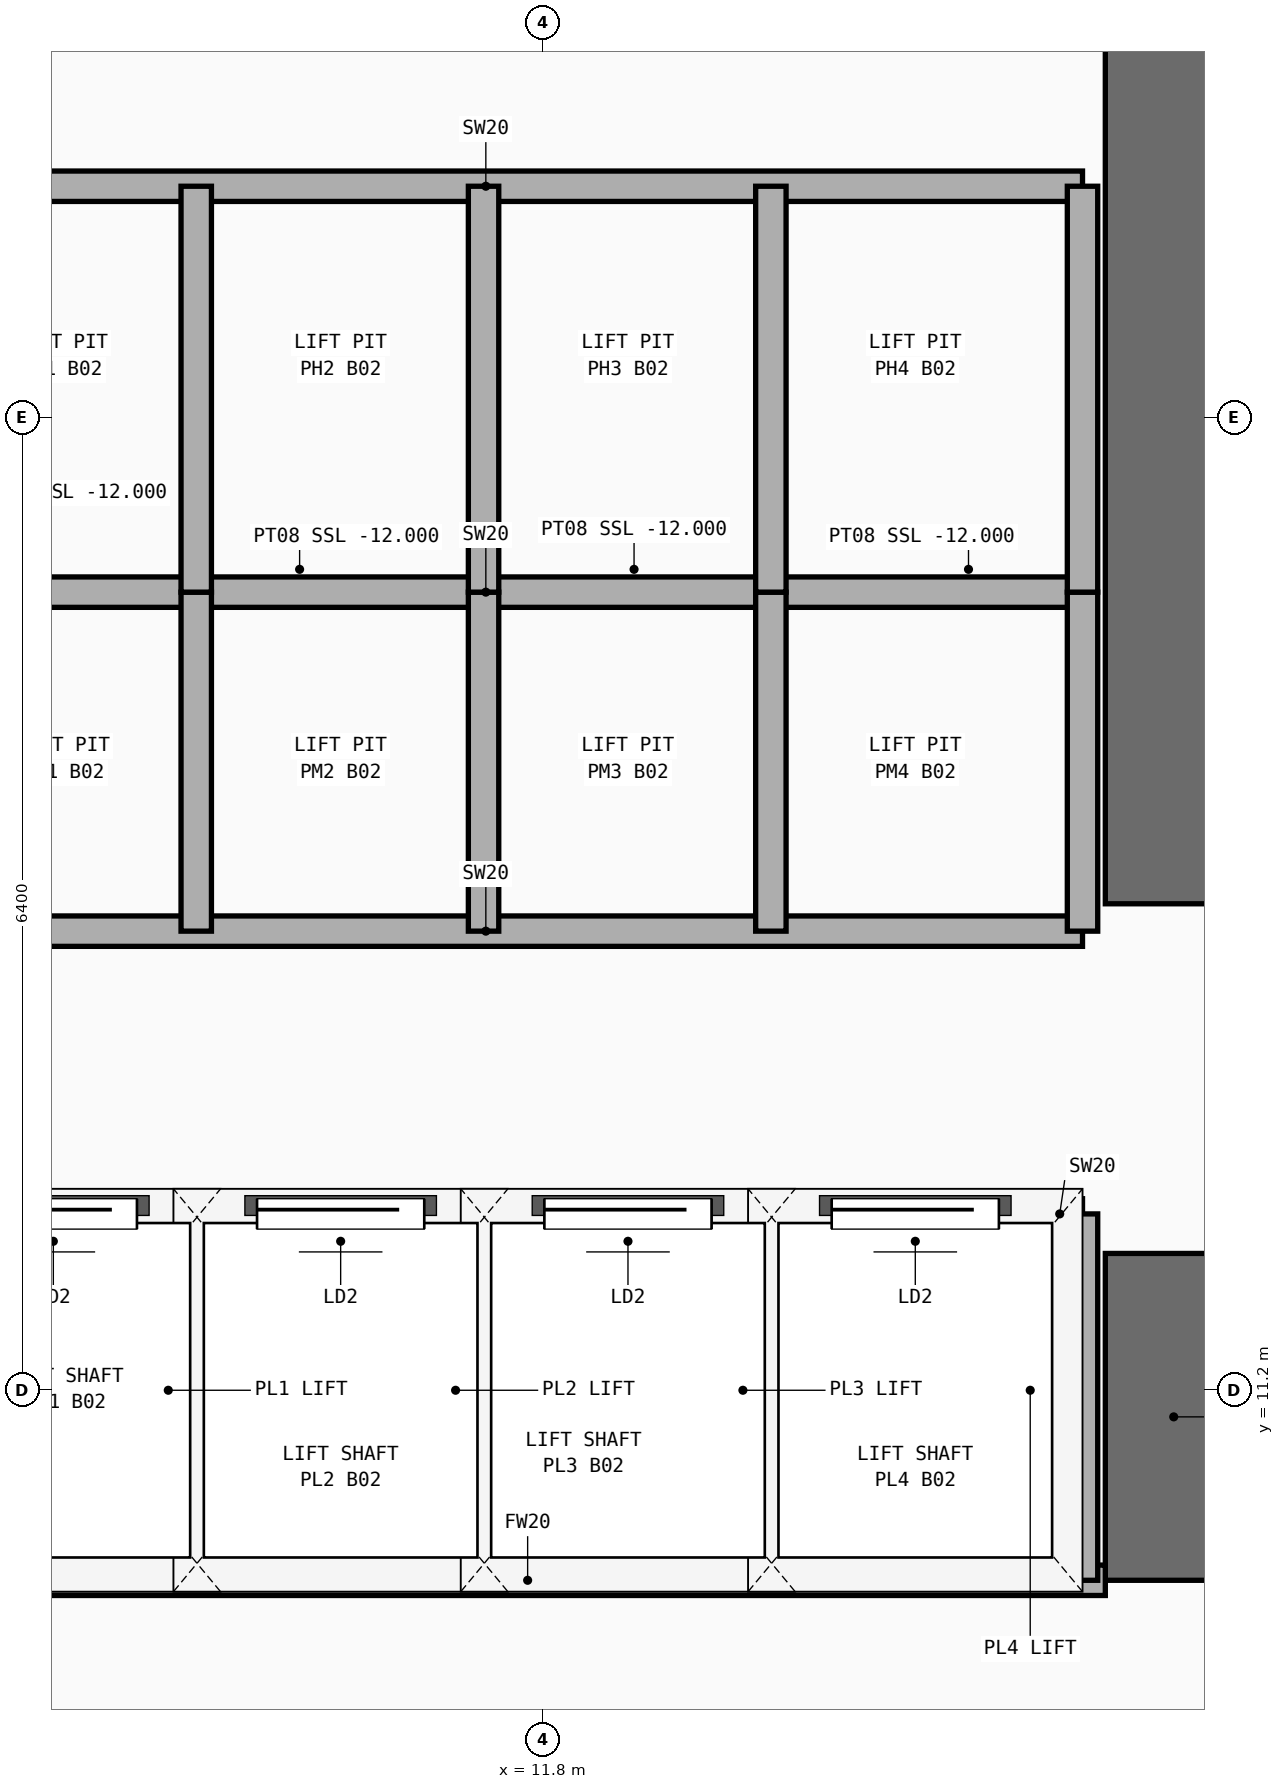
"""IFC4 building model, lengths in metres.
Left out: names, types, materials, properties, quantities, classifications, styles, units other than length and angle.
Written with IfcOpenShell. Run it as: python <this file> out.ifc"""

import sys

from ifc_helpers import new_model, si_unit, direction, frame, frame_2d, origin, place, context, subcontext, project, spatial, rectangle, extrude, element, fill, save


model = new_model("IFC4")
c1 = context("Model", 3, precision=1e-05, world=origin(), true_north=direction((0.0, 1.0)))
c2 = subcontext(c1, "Body", "Model", "MODEL_VIEW")
j1 = project(units=[si_unit("LENGTHUNIT", "METRE"), si_unit("PLANEANGLEUNIT", "RADIAN")], contexts=[c1])
p1 = place(None, origin())
s1 = spatial("IfcSite", under=j1, at=p1, CompositionType="ELEMENT")
p2 = place(p1, origin())
s2 = spatial("IfcBuilding", under=s1, at=p2, CompositionType="ELEMENT")
p3 = place(p2, frame((0.0, 0.0, -8.4)))
s3 = spatial("IfcBuildingStorey", under=s2, at=p3, CompositionType="ELEMENT", Elevation=-8.4)
p4 = place(p3, frame((15.95, 9.95, 0.0), z_axis=(0.0, 0.0, 1.0), x_axis=(0.0, 1.0, 0.0)))
e1 = element("IfcWall", 1, at=p4, inside=s3, PredefinedType="SHEAR", context=c2, shape_type="SweptSolid", body=[
    extrude(rectangle(XDim=2.15, YDim=0.9, at=frame_2d((1.075, 0.0))), origin(), (0.0, 0.0, 1.0), 3.86),
])
p5 = place(p3, frame((15.95, 14.4, 0.0), z_axis=(0.0, 0.0, 1.0), x_axis=(0.0, 1.0, 0.0)))
e2 = element("IfcWall", 2, at=p5, inside=s3, PredefinedType="SHEAR", context=c2, shape_type="SweptSolid", body=[
    extrude(rectangle(XDim=9.1, YDim=0.9, at=frame_2d((4.55, 0.0))), origin(), (0.0, 0.0, 1.0), 3.86),
])
p6 = place(p3, frame((7.9, 9.95, 0.0), z_axis=(0.0, 0.0, 1.0), x_axis=(1.0, 0.0, 0.0)))
e3 = element("IfcWall", 3, at=p6, inside=s3, PredefinedType="PARTITIONING", context=c2, shape_type="SweptSolid", body=[
    extrude(rectangle(XDim=7.6, YDim=0.2, at=frame_2d((3.8, 0.0))), origin(), (0.0, 0.0, 1.0), 3.86),
])
p7 = place(p3, frame((7.5, 12.36, 0.0), z_axis=(0.0, 0.0, 1.0), x_axis=(1.0, 0.0, 0.0)))
e4 = element("IfcWall", 4, at=p7, inside=s3, PredefinedType="PARTITIONING", context=c2, shape_type="SweptSolid", body=[
    extrude(rectangle(XDim=7.85, YDim=0.2, at=frame_2d((3.925, 0.0))), origin(), (0.0, 0.0, 1.0), 3.86),
])
p8 = place(p7, frame((0.53, 0.0, 0.0)))
e5 = element("IfcOpeningElement", 5, at=p8, cuts=e4, PredefinedType="OPENING", context=c2, shape_type="SweptSolid", body=[
    extrude(rectangle(XDim=1.1, YDim=2.2, at=frame_2d((0.55, 1.1))), frame((0.0, 0.11, 0.0), z_axis=(0.0, -1.0, 0.0), x_axis=(1.0, 0.0, 0.0)), (0.0, 0.0, 1.0), 0.22),
])
p9 = place(p7, frame((2.42, 0.0, 0.0)))
e6 = element("IfcOpeningElement", 6, at=p9, cuts=e4, PredefinedType="OPENING", context=c2, shape_type="SweptSolid", body=[
    extrude(rectangle(XDim=1.1, YDim=2.2, at=frame_2d((0.55, 1.1))), frame((0.0, 0.11, 0.0), z_axis=(0.0, -1.0, 0.0), x_axis=(1.0, 0.0, 0.0)), (0.0, 0.0, 1.0), 0.22),
])
p10 = place(p7, frame((4.31, 0.0, 0.0)))
e7 = element("IfcOpeningElement", 7, at=p10, cuts=e4, PredefinedType="OPENING", context=c2, shape_type="SweptSolid", body=[
    extrude(rectangle(XDim=1.1, YDim=2.2, at=frame_2d((0.55, 1.1))), frame((0.0, 0.11, 0.0), z_axis=(0.0, -1.0, 0.0), x_axis=(1.0, 0.0, 0.0)), (0.0, 0.0, 1.0), 0.22),
])
p11 = place(p7, frame((6.2, 0.0, 0.0)))
e8 = element("IfcOpeningElement", 8, at=p11, cuts=e4, PredefinedType="OPENING", context=c2, shape_type="SweptSolid", body=[
    extrude(rectangle(XDim=1.1, YDim=2.2, at=frame_2d((0.55, 1.1))), frame((0.0, 0.11, 0.0), z_axis=(0.0, -1.0, 0.0), x_axis=(1.0, 0.0, 0.0)), (0.0, 0.0, 1.0), 0.22),
])
for number, where, z_axis, x_axis in (
    (9, (15.35, 9.95, 0.0), (0.0, 0.0, 1.0), (0.0, 1.0, 0.0)),
    (10, (9.52, 9.95, 0.0), (0.0, 0.0, 1.0), (0.0, 1.0, 0.0)),
    (11, (11.41, 9.95, 0.0), (0.0, 0.0, 1.0), (0.0, 1.0, 0.0)),
    (12, (13.3, 9.95, 0.0), (0.0, 0.0, 1.0), (0.0, 1.0, 0.0)),
):
    element("IfcWall", number, at=place(p3, frame(where, z_axis=z_axis, x_axis=x_axis)), inside=s3, PredefinedType="PARTITIONING", context=c2, shape_type="SweptSolid", body=[
        extrude(rectangle(XDim=2.41, YDim=0.2, at=frame_2d((1.205, 0.0))), origin(), (0.0, 0.0, 1.0), 3.86),
    ])
for number, where, z_axis, x_axis in (
    (13, (7.5, 14.22, 0.0), (0.0, 0.0, 1.0), (1.0, 0.0, 0.0)),
    (14, (7.5, 16.45, 0.0), (0.0, 0.0, 1.0), (1.0, 0.0, 0.0)),
):
    element("IfcWall", number, at=place(p3, frame(where, z_axis=z_axis, x_axis=x_axis)), inside=s3, PredefinedType="PARTITIONING", context=c2, shape_type="SweptSolid", body=[
        extrude(rectangle(XDim=7.85, YDim=0.2, at=frame_2d((3.925, 0.0))), origin(), (0.0, 0.0, 1.0), 3.86),
    ])
for number, where, z_axis, x_axis in (
    (15, (15.35, 14.22, 0.0), (0.0, 0.0, 1.0), (0.0, 1.0, 0.0)),
    (16, (9.52, 14.22, 0.0), (0.0, 0.0, 1.0), (0.0, 1.0, 0.0)),
    (17, (11.41, 14.22, 0.0), (0.0, 0.0, 1.0), (0.0, 1.0, 0.0)),
    (18, (13.3, 14.22, 0.0), (0.0, 0.0, 1.0), (0.0, 1.0, 0.0)),
):
    element("IfcWall", number, at=place(p3, frame(where, z_axis=z_axis, x_axis=x_axis)), inside=s3, PredefinedType="PARTITIONING", context=c2, shape_type="SweptSolid", body=[
        extrude(rectangle(XDim=2.23, YDim=0.2, at=frame_2d((1.115, 0.0))), origin(), (0.0, 0.0, 1.0), 3.86),
    ])
p12 = place(p3, frame((7.5, 19.12, 0.0), z_axis=(0.0, 0.0, 1.0), x_axis=(1.0, 0.0, 0.0)))
e19 = element("IfcWall", 19, at=p12, inside=s3, PredefinedType="PARTITIONING", context=c2, shape_type="SweptSolid", body=[
    extrude(rectangle(XDim=7.85, YDim=0.2, at=frame_2d((3.925, 0.0))), origin(), (0.0, 0.0, 1.0), 3.86),
])
for number, where, z_axis, x_axis in (
    (20, (15.35, 16.45, 0.0), (0.0, 0.0, 1.0), (0.0, 1.0, 0.0)),
    (21, (9.52, 16.45, 0.0), (0.0, 0.0, 1.0), (0.0, 1.0, 0.0)),
    (22, (11.41, 16.45, 0.0), (0.0, 0.0, 1.0), (0.0, 1.0, 0.0)),
    (23, (13.3, 16.45, 0.0), (0.0, 0.0, 1.0), (0.0, 1.0, 0.0)),
):
    element("IfcWall", number, at=place(p3, frame(where, z_axis=z_axis, x_axis=x_axis)), inside=s3, PredefinedType="PARTITIONING", context=c2, shape_type="SweptSolid", body=[
        extrude(rectangle(XDim=2.67, YDim=0.2, at=frame_2d((1.335, 0.0))), origin(), (0.0, 0.0, 1.0), 3.86),
    ])
p13 = place(p8, origin())
e24 = element("IfcDoor", 24, at=p13, inside=s3, OperationType="SLIDING_TO_LEFT", PredefinedType="DOOR", context=c2, shape_type="SweptSolid", body=[
    extrude(rectangle(XDim=1.1, YDim=2.2, at=frame_2d((0.55, 1.1))), frame((0.0, 0.025, 0.0), z_axis=(0.0, -1.0, 0.0), x_axis=(1.0, 0.0, 0.0)), (0.0, 0.0, 1.0), 0.05),
])
fill(e5, e24)
p14 = place(p9, origin())
e25 = element("IfcDoor", 25, at=p14, inside=s3, OperationType="SLIDING_TO_LEFT", PredefinedType="DOOR", context=c2, shape_type="SweptSolid", body=[
    extrude(rectangle(XDim=1.1, YDim=2.2, at=frame_2d((0.55, 1.1))), frame((0.0, 0.025, 0.0), z_axis=(0.0, -1.0, 0.0), x_axis=(1.0, 0.0, 0.0)), (0.0, 0.0, 1.0), 0.05),
])
fill(e6, e25)
p15 = place(p10, origin())
e26 = element("IfcDoor", 26, at=p15, inside=s3, OperationType="SLIDING_TO_LEFT", PredefinedType="DOOR", context=c2, shape_type="SweptSolid", body=[
    extrude(rectangle(XDim=1.1, YDim=2.2, at=frame_2d((0.55, 1.1))), frame((0.0, 0.025, 0.0), z_axis=(0.0, -1.0, 0.0), x_axis=(1.0, 0.0, 0.0)), (0.0, 0.0, 1.0), 0.05),
])
fill(e7, e26)
p16 = place(p11, origin())
e27 = element("IfcDoor", 27, at=p16, inside=s3, OperationType="SLIDING_TO_LEFT", PredefinedType="DOOR", context=c2, shape_type="SweptSolid", body=[
    extrude(rectangle(XDim=1.1, YDim=2.2, at=frame_2d((0.55, 1.1))), frame((0.0, 0.025, 0.0), z_axis=(0.0, -1.0, 0.0), x_axis=(1.0, 0.0, 0.0)), (0.0, 0.0, 1.0), 0.05),
])
fill(e8, e27)
save(model, sys.argv[1])
